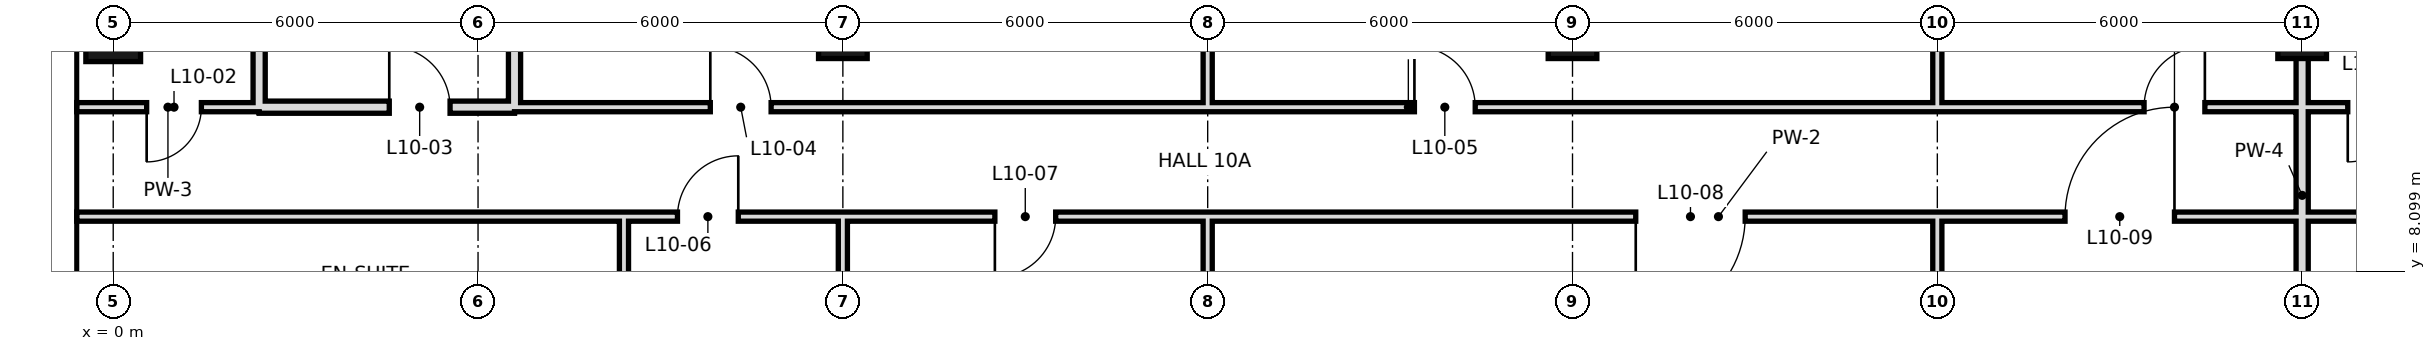
"""IFC4 building model, lengths in metres.
Left out: names, types, materials, properties, quantities, classifications, styles, units other than length and angle.
Written with IfcOpenShell. Run it as: python <this file> out.ifc"""

import sys

from ifc_helpers import new_model, si_unit, direction, frame, frame_2d, origin, origin_2d, place, context, subcontext, project, spatial, rectangle, hollow_rectangle, extrude, element, fill, save


model = new_model("IFC4")
c1 = context("Model", 3, precision=1e-05, world=origin(), true_north=direction((0.0, 1.0)))
c2 = subcontext(c1, "Body", "Model", "MODEL_VIEW")
j1 = project(units=[si_unit("LENGTHUNIT", "METRE"), si_unit("PLANEANGLEUNIT", "RADIAN")], contexts=[c1])
p1 = place(None, origin())
s1 = spatial("IfcSite", under=j1, at=p1, CompositionType="ELEMENT")
p2 = place(p1, origin())
s2 = spatial("IfcBuilding", under=s1, at=p2, CompositionType="ELEMENT")
p3 = place(p2, frame((0.0, 0.0, 57.0)))
s3 = spatial("IfcBuildingStorey", under=s2, at=p3, CompositionType="ELEMENT", Elevation=57.0)
p4 = place(p3, frame((0.0, 12.0, 0.0), z_axis=(0.0, 0.0, 1.0), x_axis=(1.0, 0.0, 0.0)))
e1 = element("IfcColumn", 1, at=p4, inside=s3, PredefinedType="COLUMN", context=c2, shape_type="SweptSolid", body=[
    extrude(hollow_rectangle(XDim=0.9, YDim=0.9, WallThickness=0.045, at=origin_2d()), origin(), (0.0, 0.0, 1.0), 3.6),
])
for number, where, z_axis, x_axis in (
    (2, (12.0, 12.0, 0.0), (0.0, 0.0, 1.0), (1.0, 0.0, 0.0)),
    (3, (24.0, 12.0, 0.0), (0.0, 0.0, 1.0), (1.0, 0.0, 0.0)),
    (4, (36.0, 12.0, 0.0), (0.0, 0.0, 1.0), (1.0, 0.0, 0.0)),
):
    element("IfcColumn", number, at=place(p3, frame(where, z_axis=z_axis, x_axis=x_axis)), inside=s3, PredefinedType="COLUMN", context=c2, shape_type="SweptSolid", body=[
        extrude(hollow_rectangle(XDim=0.8, YDim=0.8, WallThickness=0.04, at=origin_2d()), origin(), (0.0, 0.0, 1.0), 3.6),
    ])
p5 = place(p3, frame((12.0, 0.0, 0.0), z_axis=(0.0, 0.0, 1.0), x_axis=(0.0, 1.0, 0.0)))
e5 = element("IfcWall", 5, at=p5, inside=s3, PredefinedType="PARTITIONING", context=c2, shape_type="SweptSolid", body=[
    extrude(rectangle(XDim=9.0, YDim=0.15, at=frame_2d((4.5, 0.0))), origin(), (0.0, 0.0, 1.0), 2.72),
])
p6 = place(p3, frame((18.0, -0.6, 0.0), z_axis=(0.0, 0.0, 1.0), x_axis=(0.0, 1.0, 0.0)))
e6 = element("IfcWall", 6, at=p6, inside=s3, PredefinedType="PARTITIONING", context=c2, shape_type="SweptSolid", body=[
    extrude(rectangle(XDim=9.6, YDim=0.15, at=frame_2d((4.8, 0.0))), origin(), (0.0, 0.0, 1.0), 3.42),
])
p7 = place(p3, frame((18.0, 10.8, 0.0), z_axis=(0.0, 0.0, 1.0), x_axis=(0.0, 1.0, 0.0)))
e7 = element("IfcWall", 7, at=p7, inside=s3, PredefinedType="PARTITIONING", context=c2, shape_type="SweptSolid", body=[
    extrude(rectangle(XDim=7.9, YDim=0.15, at=frame_2d((3.95, 0.0))), origin(), (0.0, 0.0, 1.0), 2.72),
])
p8 = place(p3, frame((2.4, 10.8, 0.0), z_axis=(0.0, 0.0, 1.0), x_axis=(0.0, 1.0, 0.0)))
e8 = element("IfcWall", 8, at=p8, inside=s3, PredefinedType="SOLIDWALL", context=c2, shape_type="SweptSolid", body=[
    extrude(rectangle(XDim=7.2, YDim=0.2, at=frame_2d((3.6, 0.0))), origin(), (0.0, 0.0, 1.0), 2.72),
])
p9 = place(p3, frame((30.0, -0.6, 0.0), z_axis=(0.0, 0.0, 1.0), x_axis=(0.0, 1.0, 0.0)))
e9 = element("IfcWall", 9, at=p9, inside=s3, PredefinedType="PARTITIONING", context=c2, shape_type="SweptSolid", body=[
    extrude(rectangle(XDim=9.6, YDim=0.15, at=frame_2d((4.8, 0.0))), origin(), (0.0, 0.0, 1.0), 2.72),
])
p10 = place(p3, frame((30.0, 10.8, 0.0), z_axis=(0.0, 0.0, 1.0), x_axis=(0.0, 1.0, 0.0)))
e10 = element("IfcWall", 10, at=p10, inside=s3, PredefinedType="PARTITIONING", context=c2, shape_type="SweptSolid", body=[
    extrude(rectangle(XDim=7.9, YDim=0.15, at=frame_2d((3.95, 0.0))), origin(), (0.0, 0.0, 1.0), 2.72),
])
p11 = place(p3, frame((36.0, 0.0, 0.0), z_axis=(0.0, 0.0, 1.0), x_axis=(0.0, 1.0, 0.0)))
e11 = element("IfcWall", 11, at=p11, inside=s3, PredefinedType="SOLIDWALL", context=c2, shape_type="SweptSolid", body=[
    extrude(rectangle(XDim=18.7, YDim=0.2, at=frame_2d((9.35, 0.0))), origin(), (0.0, 0.0, 1.0), 2.72),
])
p12 = place(p3, frame((6.6, 10.8, 0.0), z_axis=(0.0, 0.0, 1.0), x_axis=(0.0, 1.0, 0.0)))
e12 = element("IfcWall", 12, at=p12, inside=s3, PredefinedType="SOLIDWALL", context=c2, shape_type="SweptSolid", body=[
    extrude(rectangle(XDim=7.9, YDim=0.2, at=frame_2d((3.95, 0.0))), origin(), (0.0, 0.0, 1.0), 2.72),
])
p13 = place(p3, frame((8.4, 6.0, 0.0), z_axis=(0.0, 0.0, 1.0), x_axis=(0.0, 1.0, 0.0)))
e13 = element("IfcWall", 13, at=p13, inside=s3, PredefinedType="PARTITIONING", context=c2, shape_type="SweptSolid", body=[
    extrude(rectangle(XDim=3.0, YDim=0.15, at=frame_2d((1.5, 0.0))), origin(), (0.0, 0.0, 1.0), 3.42),
])
p14 = place(p3, frame((2.4, 10.8, 0.0), z_axis=(0.0, 0.0, 1.0), x_axis=(1.0, 0.0, 0.0)))
e14 = element("IfcWall", 14, at=p14, inside=s3, PredefinedType="SOLIDWALL", context=c2, shape_type="SweptSolid", body=[
    extrude(rectangle(XDim=4.2, YDim=0.2, at=frame_2d((2.1, 0.0))), origin(), (0.0, 0.0, 1.0), 2.72),
])
p15 = place(p14, frame((2.14, 0.0, 0.0)))
e15 = element("IfcOpeningElement", 15, at=p15, cuts=e14, PredefinedType="OPENING", context=c2, shape_type="SweptSolid", body=[
    extrude(rectangle(XDim=1.0, YDim=2.4, at=frame_2d((0.5, 1.2))), frame((0.0, 0.11, 0.0), z_axis=(0.0, -1.0, 0.0), x_axis=(1.0, 0.0, 0.0)), (0.0, 0.0, 1.0), 0.22),
])
p16 = place(p3, frame((6.6, 10.8, 0.0), z_axis=(0.0, 0.0, 1.0), x_axis=(1.0, 0.0, 0.0)))
e16 = element("IfcWall", 16, at=p16, inside=s3, PredefinedType="PARTITIONING", context=c2, shape_type="SweptSolid", body=[
    extrude(rectangle(XDim=29.4, YDim=0.15, at=frame_2d((14.7, 0.0))), origin(), (0.0, 0.0, 1.0), 3.42),
])
p17 = place(p16, frame((26.8, 0.0, 0.0)))
e17 = element("IfcOpeningElement", 17, at=p17, cuts=e16, PredefinedType="OPENING", context=c2, shape_type="SweptSolid", body=[
    extrude(rectangle(XDim=1.0, YDim=2.4, at=frame_2d((0.5, 1.2))), frame((0.0, 0.085, 0.0), z_axis=(0.0, -1.0, 0.0), x_axis=(1.0, 0.0, 0.0)), (0.0, 0.0, 1.0), 0.17),
])
p18 = place(p16, frame((3.22, 0.0, 0.0)))
e18 = element("IfcOpeningElement", 18, at=p18, cuts=e16, PredefinedType="OPENING", context=c2, shape_type="SweptSolid", body=[
    extrude(rectangle(XDim=1.0, YDim=2.4, at=frame_2d((0.5, 1.2))), frame((0.0, 0.085, 0.0), z_axis=(0.0, -1.0, 0.0), x_axis=(1.0, 0.0, 0.0)), (0.0, 0.0, 1.0), 0.17),
])
p19 = place(p16, frame((14.8, 0.0, 0.0)))
e19 = element("IfcOpeningElement", 19, at=p19, cuts=e16, PredefinedType="OPENING", context=c2, shape_type="SweptSolid", body=[
    extrude(rectangle(XDim=1.0, YDim=2.4, at=frame_2d((0.5, 1.2))), frame((0.0, 0.085, 0.0), z_axis=(0.0, -1.0, 0.0), x_axis=(1.0, 0.0, 0.0)), (0.0, 0.0, 1.0), 0.17),
])
p20 = place(p3, frame((-0.6, 10.8, 0.0), z_axis=(0.0, 0.0, 1.0), x_axis=(1.0, 0.0, 0.0)))
e20 = element("IfcWall", 20, at=p20, inside=s3, PredefinedType="PARTITIONING", context=c2, shape_type="SweptSolid", body=[
    extrude(rectangle(XDim=3.0, YDim=0.15, at=frame_2d((1.5, 0.0))), origin(), (0.0, 0.0, 1.0), 3.42),
])
p21 = place(p20, frame((1.15, 0.0, 0.0)))
e21 = element("IfcOpeningElement", 21, at=p21, cuts=e20, PredefinedType="OPENING", context=c2, shape_type="SweptSolid", body=[
    extrude(rectangle(XDim=0.9, YDim=2.4, at=frame_2d((0.45, 1.2))), frame((0.0, 0.085, 0.0), z_axis=(0.0, -1.0, 0.0), x_axis=(1.0, 0.0, 0.0)), (0.0, 0.0, 1.0), 0.17),
])
p22 = place(p3, frame((36.0, 10.8, 0.0), z_axis=(0.0, 0.0, 1.0), x_axis=(1.0, 0.0, 0.0)))
e22 = element("IfcWall", 22, at=p22, inside=s3, PredefinedType="PARTITIONING", context=c2, shape_type="SweptSolid", body=[
    extrude(rectangle(XDim=2.4, YDim=0.15, at=frame_2d((1.2, 0.0))), origin(), (0.0, 0.0, 1.0), 3.42),
])
p23 = place(p22, frame((0.75, 0.0, 0.0)))
e23 = element("IfcOpeningElement", 23, at=p23, cuts=e22, PredefinedType="OPENING", context=c2, shape_type="SweptSolid", body=[
    extrude(rectangle(XDim=0.9, YDim=2.4, at=frame_2d((0.45, 1.2))), frame((0.0, 0.085, 0.0), z_axis=(0.0, -1.0, 0.0), x_axis=(1.0, 0.0, 0.0)), (0.0, 0.0, 1.0), 0.17),
])
p24 = place(p3, frame((8.4, 9.0, 0.0), z_axis=(0.0, 0.0, 1.0), x_axis=(1.0, 0.0, 0.0)))
e24 = element("IfcWall", 24, at=p24, inside=s3, PredefinedType="PARTITIONING", context=c2, shape_type="SweptSolid", body=[
    extrude(rectangle(XDim=36.0, YDim=0.15, at=frame_2d((18.0, 0.0))), origin(), (0.0, 0.0, 1.0), 3.42),
])
p25 = place(p24, frame((0.88, 0.0, 0.0)))
e25 = element("IfcOpeningElement", 25, at=p25, cuts=e24, PredefinedType="OPENING", context=c2, shape_type="SweptSolid", body=[
    extrude(rectangle(XDim=1.0, YDim=2.4, at=frame_2d((0.5, 1.2))), frame((0.0, 0.085, 0.0), z_axis=(0.0, -1.0, 0.0), x_axis=(1.0, 0.0, 0.0)), (0.0, 0.0, 1.0), 0.17),
])
p26 = place(p24, frame((6.1, 0.0, 0.0)))
e26 = element("IfcOpeningElement", 26, at=p26, cuts=e24, PredefinedType="OPENING", context=c2, shape_type="SweptSolid", body=[
    extrude(rectangle(XDim=1.0, YDim=2.4, at=frame_2d((0.5, 1.2))), frame((0.0, 0.085, 0.0), z_axis=(0.0, -1.0, 0.0), x_axis=(1.0, 0.0, 0.0)), (0.0, 0.0, 1.0), 0.17),
])
p27 = place(p24, frame((16.64, 0.0, 0.0)))
e27 = element("IfcOpeningElement", 27, at=p27, cuts=e24, PredefinedType="OPENING", context=c2, shape_type="SweptSolid", body=[
    extrude(rectangle(XDim=1.8, YDim=2.4, at=frame_2d((0.9, 1.2))), frame((0.0, 0.085, 0.0), z_axis=(0.0, -1.0, 0.0), x_axis=(1.0, 0.0, 0.0)), (0.0, 0.0, 1.0), 0.17),
])
p28 = place(p24, frame((23.7, 0.0, 0.0)))
e28 = element("IfcOpeningElement", 28, at=p28, cuts=e24, PredefinedType="OPENING", context=c2, shape_type="SweptSolid", body=[
    extrude(rectangle(XDim=1.8, YDim=2.4, at=frame_2d((0.9, 1.2))), frame((0.0, 0.085, 0.0), z_axis=(0.0, -1.0, 0.0), x_axis=(1.0, 0.0, 0.0)), (0.0, 0.0, 1.0), 0.17),
])
p29 = place(p24, frame((30.1, 0.0, 0.0)))
e29 = element("IfcOpeningElement", 29, at=p29, cuts=e24, PredefinedType="OPENING", context=c2, shape_type="SweptSolid", body=[
    extrude(rectangle(XDim=1.0, YDim=2.4, at=frame_2d((0.5, 1.2))), frame((0.0, 0.085, 0.0), z_axis=(0.0, -1.0, 0.0), x_axis=(1.0, 0.0, 0.0)), (0.0, 0.0, 1.0), 0.17),
])
p30 = place(p24, frame((34.12, 0.0, 0.0)))
e30 = element("IfcOpeningElement", 30, at=p30, cuts=e24, PredefinedType="OPENING", context=c2, shape_type="SweptSolid", body=[
    extrude(rectangle(XDim=1.0, YDim=2.4, at=frame_2d((0.5, 1.2))), frame((0.0, 0.085, 0.0), z_axis=(0.0, -1.0, 0.0), x_axis=(1.0, 0.0, 0.0)), (0.0, 0.0, 1.0), 0.17),
])
p31 = place(p3, frame((-0.6, 9.0, 0.0), z_axis=(0.0, 0.0, 1.0), x_axis=(1.0, 0.0, 0.0)))
e31 = element("IfcWall", 31, at=p31, inside=s3, PredefinedType="PARTITIONING", context=c2, shape_type="SweptSolid", body=[
    extrude(rectangle(XDim=9.0, YDim=0.15, at=frame_2d((4.5, 0.0))), origin(), (0.0, 0.0, 1.0), 3.42),
])
p32 = place(p17, frame((1.0, 0.0, 0.0), z_axis=(0.0, 0.0, 1.0), x_axis=(-1.0, 0.0, 0.0)))
e32 = element("IfcDoor", 32, at=p32, inside=s3, OperationType="SINGLE_SWING_LEFT", PredefinedType="DOOR", context=c2, shape_type="SweptSolid", body=[
    extrude(rectangle(XDim=1.0, YDim=2.4, at=frame_2d((0.5, 1.2))), frame((0.0, 0.025, 0.0), z_axis=(0.0, -1.0, 0.0), x_axis=(1.0, 0.0, 0.0)), (0.0, 0.0, 1.0), 0.05),
])
fill(e17, e32)
p33 = place(p21, frame((0.9, 0.0, 0.0), z_axis=(0.0, 0.0, 1.0), x_axis=(-1.0, 0.0, 0.0)))
e33 = element("IfcDoor", 33, at=p33, inside=s3, OperationType="SINGLE_SWING_RIGHT", PredefinedType="DOOR", context=c2, shape_type="SweptSolid", body=[
    extrude(rectangle(XDim=0.9, YDim=2.4, at=frame_2d((0.45, 1.2))), frame((0.0, 0.025, 0.0), z_axis=(0.0, -1.0, 0.0), x_axis=(1.0, 0.0, 0.0)), (0.0, 0.0, 1.0), 0.05),
])
fill(e21, e33)
p34 = place(p15, origin())
e34 = element("IfcDoor", 34, at=p34, inside=s3, OperationType="SINGLE_SWING_LEFT", PredefinedType="DOOR", context=c2, shape_type="SweptSolid", body=[
    extrude(rectangle(XDim=1.0, YDim=2.4, at=frame_2d((0.5, 1.2))), frame((0.0, 0.025, 0.0), z_axis=(0.0, -1.0, 0.0), x_axis=(1.0, 0.0, 0.0)), (0.0, 0.0, 1.0), 0.05),
])
fill(e15, e34)
p35 = place(p18, origin())
e35 = element("IfcDoor", 35, at=p35, inside=s3, OperationType="SINGLE_SWING_LEFT", PredefinedType="DOOR", context=c2, shape_type="SweptSolid", body=[
    extrude(rectangle(XDim=1.0, YDim=2.4, at=frame_2d((0.5, 1.2))), frame((0.0, 0.025, 0.0), z_axis=(0.0, -1.0, 0.0), x_axis=(1.0, 0.0, 0.0)), (0.0, 0.0, 1.0), 0.05),
])
fill(e18, e35)
p36 = place(p19, origin())
e36 = element("IfcDoor", 36, at=p36, inside=s3, OperationType="SINGLE_SWING_LEFT", PredefinedType="DOOR", context=c2, shape_type="SweptSolid", body=[
    extrude(rectangle(XDim=1.0, YDim=2.4, at=frame_2d((0.5, 1.2))), frame((0.0, 0.025, 0.0), z_axis=(0.0, -1.0, 0.0), x_axis=(1.0, 0.0, 0.0)), (0.0, 0.0, 1.0), 0.05),
])
fill(e19, e36)
p37 = place(p25, frame((1.0, 0.0, 0.0), z_axis=(0.0, 0.0, 1.0), x_axis=(-1.0, 0.0, 0.0)))
e37 = element("IfcDoor", 37, at=p37, inside=s3, OperationType="SINGLE_SWING_LEFT", PredefinedType="DOOR", context=c2, shape_type="SweptSolid", body=[
    extrude(rectangle(XDim=1.0, YDim=2.4, at=frame_2d((0.5, 1.2))), frame((0.0, 0.025, 0.0), z_axis=(0.0, -1.0, 0.0), x_axis=(1.0, 0.0, 0.0)), (0.0, 0.0, 1.0), 0.05),
])
fill(e25, e37)
p38 = place(p26, frame((1.0, 0.0, 0.0), z_axis=(0.0, 0.0, 1.0), x_axis=(-1.0, 0.0, 0.0)))
e38 = element("IfcDoor", 38, at=p38, inside=s3, OperationType="SINGLE_SWING_RIGHT", PredefinedType="DOOR", context=c2, shape_type="SweptSolid", body=[
    extrude(rectangle(XDim=1.0, YDim=2.4, at=frame_2d((0.5, 1.2))), frame((0.0, 0.025, 0.0), z_axis=(0.0, -1.0, 0.0), x_axis=(1.0, 0.0, 0.0)), (0.0, 0.0, 1.0), 0.05),
])
fill(e26, e38)
p39 = place(p27, frame((1.8, 0.0, 0.0), z_axis=(0.0, 0.0, 1.0), x_axis=(-1.0, 0.0, 0.0)))
e39 = element("IfcDoor", 39, at=p39, inside=s3, OperationType="SINGLE_SWING_RIGHT", PredefinedType="DOOR", context=c2, shape_type="SweptSolid", body=[
    extrude(rectangle(XDim=1.8, YDim=2.4, at=frame_2d((0.9, 1.2))), frame((0.0, 0.025, 0.0), z_axis=(0.0, -1.0, 0.0), x_axis=(1.0, 0.0, 0.0)), (0.0, 0.0, 1.0), 0.05),
])
fill(e27, e39)
p40 = place(p28, frame((1.8, 0.0, 0.0), z_axis=(0.0, 0.0, 1.0), x_axis=(-1.0, 0.0, 0.0)))
e40 = element("IfcDoor", 40, at=p40, inside=s3, OperationType="SINGLE_SWING_LEFT", PredefinedType="DOOR", context=c2, shape_type="SweptSolid", body=[
    extrude(rectangle(XDim=1.8, YDim=2.4, at=frame_2d((0.9, 1.2))), frame((0.0, 0.025, 0.0), z_axis=(0.0, -1.0, 0.0), x_axis=(1.0, 0.0, 0.0)), (0.0, 0.0, 1.0), 0.05),
])
fill(e28, e40)
p41 = place(p23, frame((0.9, 0.0, 0.0), z_axis=(0.0, 0.0, 1.0), x_axis=(-1.0, 0.0, 0.0)))
e41 = element("IfcDoor", 41, at=p41, inside=s3, OperationType="SINGLE_SWING_RIGHT", PredefinedType="DOOR", context=c2, shape_type="SweptSolid", body=[
    extrude(rectangle(XDim=0.9, YDim=2.4, at=frame_2d((0.45, 1.2))), frame((0.0, 0.025, 0.0), z_axis=(0.0, -1.0, 0.0), x_axis=(1.0, 0.0, 0.0)), (0.0, 0.0, 1.0), 0.05),
])
fill(e23, e41)
save(model, sys.argv[1])
